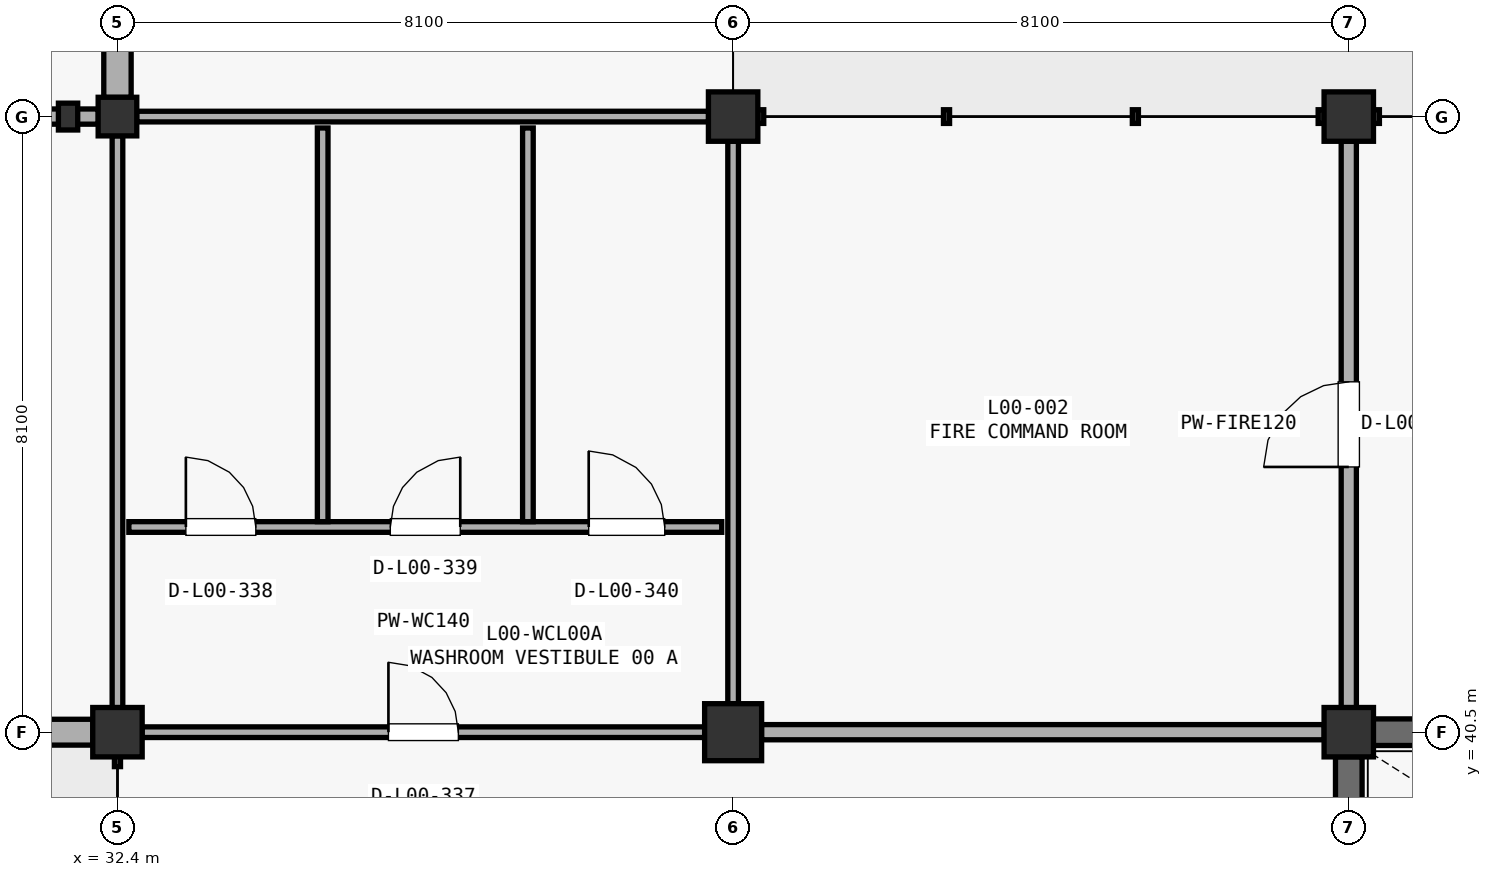
"""IFC4 building model, lengths in metres.
Left out: names, types, materials, properties, quantities, classifications, styles, units other than length and angle.
Written with IfcOpenShell. Run it as: python <this file> out.ifc"""

import sys

from ifc_helpers import new_model, si_unit, direction, frame, frame_2d, origin, origin_2d, place, context, subcontext, project, spatial, rectangle, circle, hollow_circle, i_section, extrude, element, fill, save


model = new_model("IFC4")
c1 = context("Model", 3, precision=1e-05, world=origin(), true_north=direction((0.0, 1.0)))
c2 = subcontext(c1, "Body", "Model", "MODEL_VIEW")
j1 = project(units=[si_unit("LENGTHUNIT", "METRE"), si_unit("PLANEANGLEUNIT", "RADIAN")], contexts=[c1])
p1 = place(None, origin())
s1 = spatial("IfcSite", under=j1, at=p1, CompositionType="ELEMENT")
p2 = place(p1, origin())
s2 = spatial("IfcBuilding", under=s1, at=p2, CompositionType="ELEMENT")
p3 = place(p2, origin())
s3 = spatial("IfcBuildingStorey", under=s2, at=p3, CompositionType="ELEMENT", Elevation=0.0)
p4 = place(p3, frame((32.4, 40.5, 0.0), z_axis=(0.0, 0.0, 1.0), x_axis=(1.0, 0.0, 0.0)))
e1 = element("IfcColumn", 1, at=p4, inside=s3, PredefinedType="COLUMN", context=c2, shape_type="SweptSolid", body=[
    extrude(rectangle(XDim=0.65, YDim=0.65, at=origin_2d()), origin(), (0.0, 0.0, 1.0), 5.1),
])
p5 = place(p3, frame((32.4, 48.6, 0.0), z_axis=(0.0, 0.0, 1.0), x_axis=(1.0, 0.0, 0.0)))
e2 = element("IfcColumn", 2, at=p5, inside=s3, PredefinedType="COLUMN", context=c2, shape_type="SweptSolid", body=[
    extrude(hollow_circle(Radius=0.254, WallThickness=0.019, at=origin_2d()), origin(), (0.0, 0.0, 1.0), 5.1),
])
p6 = place(p3, frame((40.5, 40.5, 0.0), z_axis=(0.0, 0.0, 1.0), x_axis=(1.0, 0.0, 0.0)))
e3 = element("IfcColumn", 3, at=p6, inside=s3, PredefinedType="COLUMN", context=c2, shape_type="SweptSolid", body=[
    extrude(circle(Radius=0.375, at=origin_2d()), origin(), (0.0, 0.0, 1.0), 5.1),
])
for number, where, z_axis, x_axis in (
    (4, (40.5, 48.6, 0.0), (0.0, 0.0, 1.0), (1.0, 0.0, 0.0)),
    (5, (48.6, 40.5, 0.0), (0.0, 0.0, 1.0), (1.0, 0.0, 0.0)),
    (6, (48.6, 48.6, 0.0), (0.0, 0.0, 1.0), (1.0, 0.0, 0.0)),
):
    element("IfcColumn", number, at=place(p3, frame(where, z_axis=z_axis, x_axis=x_axis)), inside=s3, PredefinedType="COLUMN", context=c2, shape_type="SweptSolid", body=[
        extrude(rectangle(XDim=0.65, YDim=0.65, at=origin_2d()), origin(), (0.0, 0.0, 1.0), 5.1),
    ])
p7 = place(p3, frame((31.75, 48.6, 0.0), z_axis=(0.0, 0.0, 1.0), x_axis=(1.0, 0.0, 0.0)))
e7 = element("IfcColumn", 7, at=p7, inside=s3, PredefinedType="PILASTER", context=c2, shape_type="SweptSolid", body=[
    extrude(i_section(OverallWidth=0.254, OverallDepth=0.353, WebThickness=0.01, FlangeThickness=0.016, FilletRadius=0.016, at=origin_2d()), origin(), (0.0, 0.0, 1.0), 2.943),
])
p8 = place(p3, frame((24.623, 40.5, 0.0), z_axis=(0.0, 0.0, 1.0), x_axis=(1.0, 0.0, 0.0)))
e8 = element("IfcWall", 8, at=p8, inside=s3, PredefinedType="STANDARD", context=c2, shape_type="SweptSolid", body=[
    extrude(rectangle(XDim=7.454, YDim=0.34, at=frame_2d((3.727, 0.0))), origin(), (0.0, 0.0, 1.0), 4.466),
])
p9 = place(p8, frame((2.677, 0.0, 1.25)))
e9 = element("IfcOpeningElement", 9, at=p9, cuts=e8, PredefinedType="OPENING", context=c2, shape_type="SweptSolid", body=[
    extrude(rectangle(XDim=2.1, YDim=1.5, at=frame_2d((1.05, 0.75))), frame((0.0, 0.18, 0.0), z_axis=(0.0, -1.0, 0.0), x_axis=(1.0, 0.0, 0.0)), (0.0, 0.0, 1.0), 0.36),
])
p10 = place(p3, frame((32.4, 48.852, 0.0), z_axis=(0.0, 0.0, 1.0), x_axis=(0.0, 1.0, 0.0)))
e10 = element("IfcWall", 10, at=p10, inside=s3, PredefinedType="STANDARD", context=c2, shape_type="SweptSolid", body=[
    extrude(rectangle(XDim=7.673, YDim=0.36, at=frame_2d((3.837, 0.0))), origin(), (0.0, 0.0, 1.0), 4.289),
])
p11 = place(p10, frame((2.487, 0.0, 0.85)))
e11 = element("IfcOpeningElement", 11, at=p11, cuts=e10, PredefinedType="OPENING", context=c2, shape_type="SweptSolid", body=[
    extrude(rectangle(XDim=2.7, YDim=1.55, at=frame_2d((1.35, 0.775))), frame((0.0, 0.19, 0.0), z_axis=(0.0, -1.0, 0.0), x_axis=(1.0, 0.0, 0.0)), (0.0, 0.0, 1.0), 0.38),
])
p12 = place(p3, frame((48.923, 40.5, 0.0), z_axis=(0.0, 0.0, 1.0), x_axis=(1.0, 0.0, 0.0)))
e12 = element("IfcWall", 12, at=p12, inside=s3, PredefinedType="SHEAR", context=c2, shape_type="SweptSolid", body=[
    extrude(rectangle(XDim=7.454, YDim=0.35, at=frame_2d((3.727, 0.0))), origin(), (0.0, 0.0, 1.0), 4.822),
])
p13 = place(p12, frame((5.204, 0.0, 0.0)))
e13 = element("IfcOpeningElement", 13, at=p13, cuts=e12, PredefinedType="OPENING", context=c2, shape_type="SweptSolid", body=[
    extrude(rectangle(XDim=1.2, YDim=2.2, at=frame_2d((0.6, 1.1))), frame((0.0, 0.185, 0.0), z_axis=(0.0, -1.0, 0.0), x_axis=(1.0, 0.0, 0.0)), (0.0, 0.0, 1.0), 0.37),
])
p14 = place(p3, frame((48.6, 32.773, 0.0), z_axis=(0.0, 0.0, 1.0), x_axis=(0.0, 1.0, 0.0)))
e14 = element("IfcWall", 14, at=p14, inside=s3, PredefinedType="SHEAR", context=c2, shape_type="SweptSolid", body=[
    extrude(rectangle(XDim=7.404, YDim=0.35, at=frame_2d((3.702, 0.0))), origin(), (0.0, 0.0, 1.0), 4.822),
])
p15 = place(p3, frame((32.723, 40.5, 0.0), z_axis=(0.0, 0.0, 1.0), x_axis=(1.0, 0.0, 0.0)))
e15 = element("IfcWall", 15, at=p15, inside=s3, PredefinedType="PARTITIONING", context=c2, shape_type="SweptSolid", body=[
    extrude(rectangle(XDim=7.404, YDim=0.14, at=frame_2d((3.702, 0.0))), origin(), (0.0, 0.0, 1.0), 4.271),
])
p16 = place(p15, frame((3.242, 0.0, 0.0)))
e16 = element("IfcOpeningElement", 16, at=p16, cuts=e15, PredefinedType="OPENING", context=c2, shape_type="SweptSolid", body=[
    extrude(rectangle(XDim=0.92, YDim=2.15, at=frame_2d((0.46, 1.075))), frame((0.0, 0.08, 0.0), z_axis=(0.0, -1.0, 0.0), x_axis=(1.0, 0.0, 0.0)), (0.0, 0.0, 1.0), 0.16),
])
p17 = place(p3, frame((32.652, 48.6, 0.0), z_axis=(0.0, 0.0, 1.0), x_axis=(1.0, 0.0, 0.0)))
e17 = element("IfcWall", 17, at=p17, inside=s3, PredefinedType="PARTITIONING", context=c2, shape_type="SweptSolid", body=[
    extrude(rectangle(XDim=7.525, YDim=0.14, at=frame_2d((3.762, 0.0))), origin(), (0.0, 0.0, 1.0), 4.287),
])
p18 = place(p3, frame((32.4, 40.823, 0.0), z_axis=(0.0, 0.0, 1.0), x_axis=(0.0, 1.0, 0.0)))
e18 = element("IfcWall", 18, at=p18, inside=s3, PredefinedType="PARTITIONING", context=c2, shape_type="SweptSolid", body=[
    extrude(rectangle(XDim=7.525, YDim=0.14, at=frame_2d((3.762, 0.0))), origin(), (0.0, 0.0, 1.0), 4.271),
])
p19 = place(p3, frame((40.5, 40.873, 0.0), z_axis=(0.0, 0.0, 1.0), x_axis=(0.0, 1.0, 0.0)))
e19 = element("IfcWall", 19, at=p19, inside=s3, PredefinedType="PARTITIONING", context=c2, shape_type="SweptSolid", body=[
    extrude(rectangle(XDim=7.404, YDim=0.14, at=frame_2d((3.702, 0.0))), origin(), (0.0, 0.0, 1.0), 4.287),
])
p20 = place(p3, frame((32.55, 43.2, 0.0), z_axis=(0.0, 0.0, 1.0), x_axis=(1.0, 0.0, 0.0)))
e20 = element("IfcWall", 20, at=p20, inside=s3, PredefinedType="PARTITIONING", context=c2, shape_type="SweptSolid", body=[
    extrude(rectangle(XDim=7.8, YDim=0.14, at=frame_2d((3.9, 0.0))), origin(), (0.0, 0.0, 1.0), 4.822),
])
p21 = place(p20, frame((0.75, 0.0, 0.0)))
e21 = element("IfcOpeningElement", 21, at=p21, cuts=e20, PredefinedType="OPENING", context=c2, shape_type="SweptSolid", body=[
    extrude(rectangle(XDim=0.92, YDim=2.15, at=frame_2d((0.46, 1.075))), frame((0.0, 0.08, 0.0), z_axis=(0.0, -1.0, 0.0), x_axis=(1.0, 0.0, 0.0)), (0.0, 0.0, 1.0), 0.16),
])
p22 = place(p20, frame((3.44, 0.0, 0.0)))
e22 = element("IfcOpeningElement", 22, at=p22, cuts=e20, PredefinedType="OPENING", context=c2, shape_type="SweptSolid", body=[
    extrude(rectangle(XDim=0.92, YDim=2.15, at=frame_2d((0.46, 1.075))), frame((0.0, 0.08, 0.0), z_axis=(0.0, -1.0, 0.0), x_axis=(1.0, 0.0, 0.0)), (0.0, 0.0, 1.0), 0.16),
])
p23 = place(p20, frame((6.05, 0.0, 0.0)))
e23 = element("IfcOpeningElement", 23, at=p23, cuts=e20, PredefinedType="OPENING", context=c2, shape_type="SweptSolid", body=[
    extrude(rectangle(XDim=1.0, YDim=2.15, at=frame_2d((0.5, 1.075))), frame((0.0, 0.08, 0.0), z_axis=(0.0, -1.0, 0.0), x_axis=(1.0, 0.0, 0.0)), (0.0, 0.0, 1.0), 0.16),
])
for number, where, z_axis, x_axis in (
    (24, (35.1, 43.27, 0.0), (0.0, 0.0, 1.0), (0.0, 1.0, 0.0)),
    (25, (37.8, 43.27, 0.0), (0.0, 0.0, 1.0), (0.0, 1.0, 0.0)),
):
    element("IfcWall", number, at=place(p3, frame(where, z_axis=z_axis, x_axis=x_axis)), inside=s3, PredefinedType="PARTITIONING", context=c2, shape_type="SweptSolid", body=[
        extrude(rectangle(XDim=5.18, YDim=0.14, at=frame_2d((2.59, 0.0))), origin(), (0.0, 0.0, 1.0), 4.822),
    ])
p24 = place(p3, frame((48.6, 40.823, 0.0), z_axis=(0.0, 0.0, 1.0), x_axis=(0.0, 1.0, 0.0)))
e26 = element("IfcWall", 26, at=p24, inside=s3, PredefinedType="PARTITIONING", context=c2, shape_type="SweptSolid", body=[
    extrude(rectangle(XDim=7.454, YDim=0.2, at=frame_2d((3.727, 0.0))), origin(), (0.0, 0.0, 1.0), 4.359),
])
p25 = place(p24, frame((3.167, 0.0, 0.0)))
e27 = element("IfcOpeningElement", 27, at=p25, cuts=e26, PredefinedType="OPENING", context=c2, shape_type="SweptSolid", body=[
    extrude(rectangle(XDim=1.12, YDim=2.2, at=frame_2d((0.56, 1.1))), frame((0.0, 0.11, 0.0), z_axis=(0.0, -1.0, 0.0), x_axis=(1.0, 0.0, 0.0)), (0.0, 0.0, 1.0), 0.22),
])
p26 = place(p3, frame((40.873, 40.5, 0.0), z_axis=(0.0, 0.0, 1.0), x_axis=(1.0, 0.0, 0.0)))
e28 = element("IfcWall", 28, at=p26, inside=s3, PredefinedType="PARTITIONING", context=c2, shape_type="SweptSolid", body=[
    extrude(rectangle(XDim=7.404, YDim=0.2, at=frame_2d((3.702, 0.0))), origin(), (0.0, 0.0, 1.0), 4.289),
])
p27 = place(p3, frame((24.623, 48.6, 0.0), z_axis=(0.0, 0.0, 1.0), x_axis=(1.0, 0.0, 0.0)))
e29 = element("IfcWall", 29, at=p27, inside=s3, PredefinedType="PARTITIONING", context=c2, shape_type="SweptSolid", body=[
    extrude(rectangle(XDim=7.525, YDim=0.2, at=frame_2d((3.762, 0.0))), origin(), (0.0, 0.0, 1.0), 4.407),
])
p28 = place(p16, origin())
e30 = element("IfcDoor", 30, at=p28, inside=s3, OperationType="SINGLE_SWING_LEFT", PredefinedType="DOOR", context=c2, shape_type="SweptSolid", body=[
    extrude(rectangle(XDim=0.92, YDim=2.15, at=frame_2d((0.46, 1.075))), frame((0.0, 0.025, 0.0), z_axis=(0.0, -1.0, 0.0), x_axis=(1.0, 0.0, 0.0)), (0.0, 0.0, 1.0), 0.05),
])
fill(e16, e30)
p29 = place(p21, origin())
e31 = element("IfcDoor", 31, at=p29, inside=s3, OperationType="SINGLE_SWING_LEFT", PredefinedType="DOOR", context=c2, shape_type="SweptSolid", body=[
    extrude(rectangle(XDim=0.92, YDim=2.15, at=frame_2d((0.46, 1.075))), frame((0.0, 0.025, 0.0), z_axis=(0.0, -1.0, 0.0), x_axis=(1.0, 0.0, 0.0)), (0.0, 0.0, 1.0), 0.05),
])
fill(e21, e31)
p30 = place(p22, origin())
e32 = element("IfcDoor", 32, at=p30, inside=s3, OperationType="SINGLE_SWING_RIGHT", PredefinedType="DOOR", context=c2, shape_type="SweptSolid", body=[
    extrude(rectangle(XDim=0.92, YDim=2.15, at=frame_2d((0.46, 1.075))), frame((0.0, 0.025, 0.0), z_axis=(0.0, -1.0, 0.0), x_axis=(1.0, 0.0, 0.0)), (0.0, 0.0, 1.0), 0.05),
])
fill(e22, e32)
p31 = place(p23, origin())
e33 = element("IfcDoor", 33, at=p31, inside=s3, OperationType="SINGLE_SWING_LEFT", PredefinedType="DOOR", context=c2, shape_type="SweptSolid", body=[
    extrude(rectangle(XDim=1.0, YDim=2.15, at=frame_2d((0.5, 1.075))), frame((0.0, 0.025, 0.0), z_axis=(0.0, -1.0, 0.0), x_axis=(1.0, 0.0, 0.0)), (0.0, 0.0, 1.0), 0.05),
])
fill(e23, e33)
p32 = place(p25, origin())
e34 = element("IfcDoor", 34, at=p32, inside=s3, OperationType="SINGLE_SWING_LEFT", PredefinedType="DOOR", context=c2, shape_type="SweptSolid", body=[
    extrude(rectangle(XDim=1.12, YDim=2.2, at=frame_2d((0.56, 1.1))), frame((0.0, 0.025, 0.0), z_axis=(0.0, -1.0, 0.0), x_axis=(1.0, 0.0, 0.0)), (0.0, 0.0, 1.0), 0.05),
])
fill(e27, e34)
save(model, sys.argv[1])
